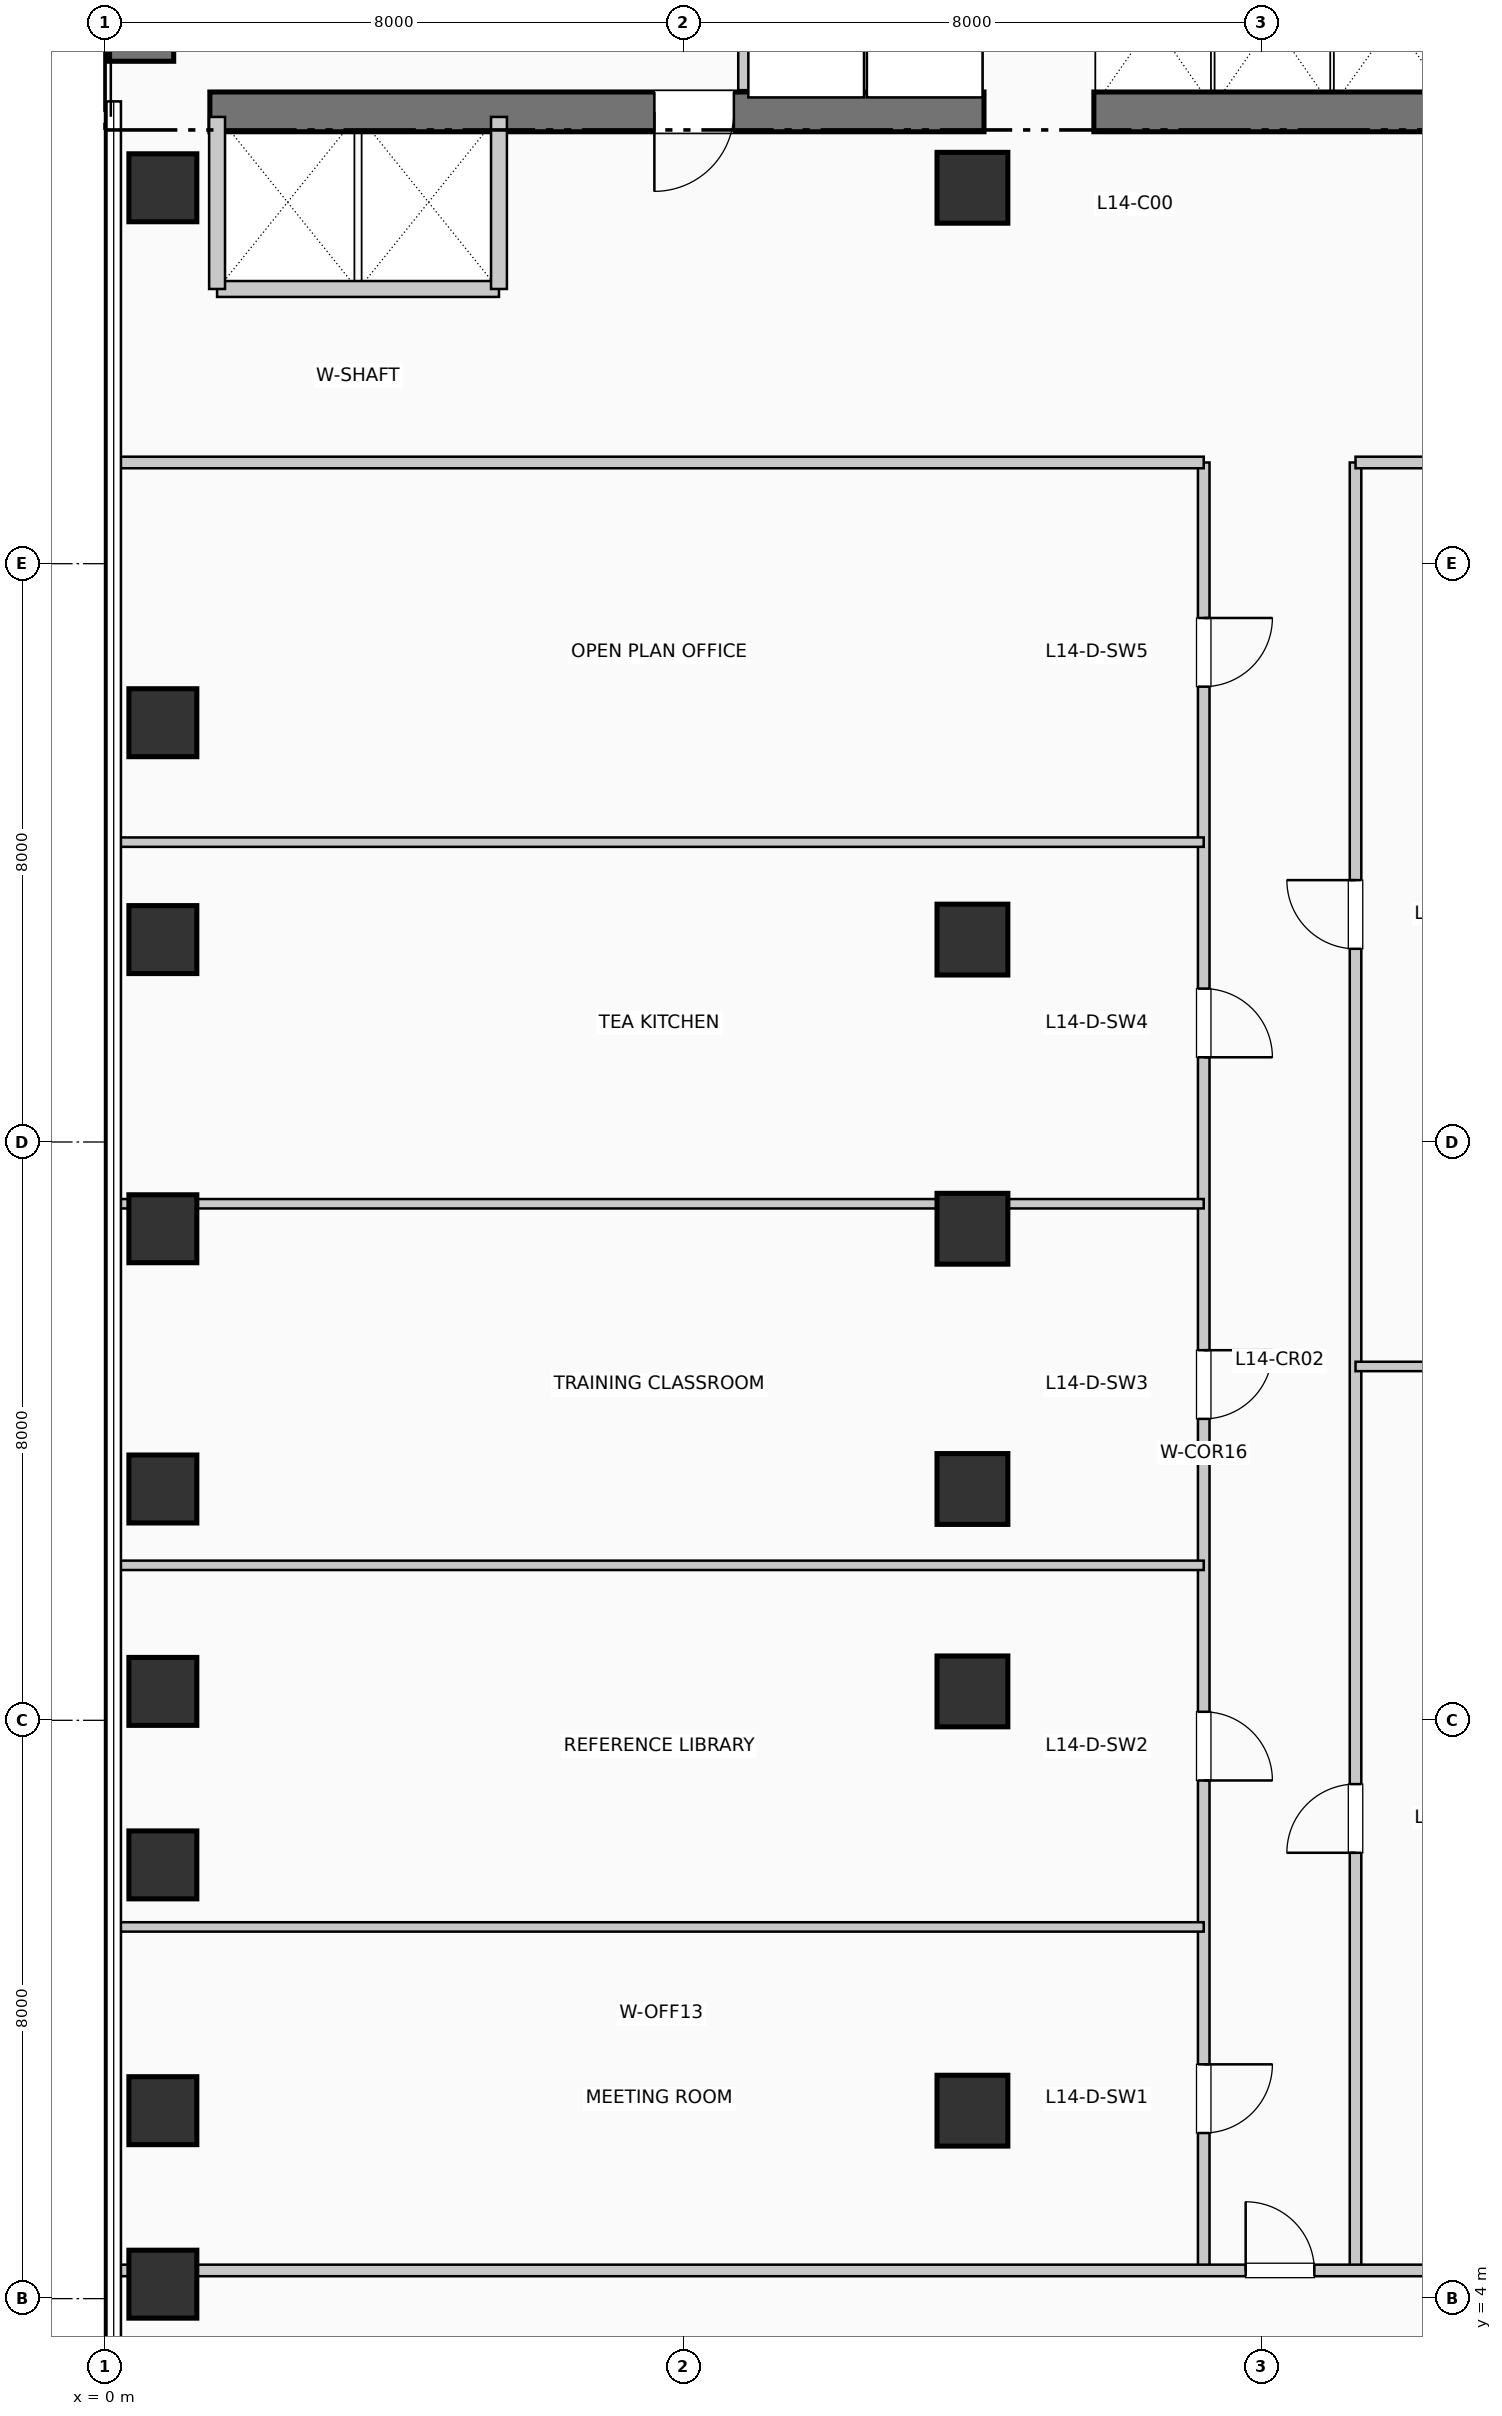
"""IFC4 building model, lengths in metres.
Left out: names, types, materials, properties, quantities, classifications, styles, units other than length and angle.
Written with IfcOpenShell. Run it as: python <this file> out.ifc"""

import sys

from ifc_helpers import new_model, si_unit, direction, frame, frame_2d, origin, origin_2d, place, context, subcontext, project, spatial, rectangle, extrude, element, fill, save


model = new_model("IFC4")
c1 = context("Model", 3, precision=1e-05, world=origin(), true_north=direction((0.0, 1.0)))
c2 = subcontext(c1, "Body", "Model", "MODEL_VIEW")
j1 = project(units=[si_unit("LENGTHUNIT", "METRE"), si_unit("PLANEANGLEUNIT", "RADIAN")], contexts=[c1])
p1 = place(None, origin())
s1 = spatial("IfcSite", under=j1, at=p1, CompositionType="ELEMENT")
p2 = place(p1, origin())
s2 = spatial("IfcBuilding", under=s1, at=p2, CompositionType="ELEMENT")
p3 = place(p2, frame((0.0, 0.0, 62.04)))
s3 = spatial("IfcBuildingStorey", under=s2, at=p3, CompositionType="ELEMENT", Elevation=62.04)
p4 = place(p3, frame((0.5, 34.95, 0.0), z_axis=(0.0, 0.0, 1.0), x_axis=(0.0, 1.0, 0.0)))
e1 = element("IfcWall", 1, at=p4, inside=s3, PredefinedType="SHEAR", context=c2, shape_type="SweptSolid", body=[
    extrude(rectangle(XDim=7.9, YDim=0.9, at=frame_2d((3.95, 0.0))), origin(), (0.0, 0.0, 1.0), 3.96),
])
p5 = place(p3, frame((1.45, 34.25, 0.0), z_axis=(0.0, 0.0, 1.0), x_axis=(1.0, 0.0, 0.0)))
e2 = element("IfcWall", 2, at=p5, inside=s3, PredefinedType="SHEAR", context=c2, shape_type="SweptSolid", body=[
    extrude(rectangle(XDim=10.71, YDim=0.55, at=frame_2d((5.355, 0.0))), origin(), (0.0, 0.0, 1.0), 3.96),
])
p6 = place(p5, frame((7.25, 0.0, 0.0), z_axis=(0.0, 0.0, 1.0), x_axis=(-1.0, 0.0, 0.0)))
e3 = element("IfcOpeningElement", 3, at=p6, cuts=e2, PredefinedType="OPENING", context=c2, shape_type="SweptSolid", body=[
    extrude(rectangle(XDim=1.1, YDim=2.15, at=frame_2d((0.55, 1.075))), frame((0.0, 0.285, 0.0), z_axis=(0.0, -1.0, 0.0), x_axis=(1.0, 0.0, 0.0)), (0.0, 0.0, 1.0), 0.57),
])
p7 = place(p3, frame((13.68, 34.25, 0.0), z_axis=(0.0, 0.0, 1.0), x_axis=(1.0, 0.0, 0.0)))
e4 = element("IfcWall", 4, at=p7, inside=s3, PredefinedType="SHEAR", context=c2, shape_type="SweptSolid", body=[
    extrude(rectangle(XDim=6.12, YDim=0.55, at=frame_2d((3.06, 0.0))), origin(), (0.0, 0.0, 1.0), 3.96),
])
for number, where, z_axis, x_axis in (
    (5, (0.8, 4.2, 0.0), (0.0, 0.0, 1.0), (1.0, 0.0, 0.0)),
    (6, (0.8, 6.6, 0.0), (0.0, 0.0, 1.0), (1.0, 0.0, 0.0)),
    (7, (0.8, 10.0, 0.0), (0.0, 0.0, 1.0), (1.0, 0.0, 0.0)),
    (8, (0.8, 12.4, 0.0), (0.0, 0.0, 1.0), (1.0, 0.0, 0.0)),
    (9, (0.8, 15.2, 0.0), (0.0, 0.0, 1.0), (1.0, 0.0, 0.0)),
    (10, (0.8, 18.8, 0.0), (0.0, 0.0, 1.0), (1.0, 0.0, 0.0)),
    (11, (0.8, 22.8, 0.0), (0.0, 0.0, 1.0), (1.0, 0.0, 0.0)),
    (12, (0.8, 25.8, 0.0), (0.0, 0.0, 1.0), (1.0, 0.0, 0.0)),
    (13, (0.8, 33.2, 0.0), (0.0, 0.0, 1.0), (1.0, 0.0, 0.0)),
):
    element("IfcColumn", number, at=place(p3, frame(where, z_axis=z_axis, x_axis=x_axis)), inside=s3, PredefinedType="COLUMN", context=c2, shape_type="SweptSolid", body=[
        extrude(rectangle(XDim=0.94, YDim=0.94, at=origin_2d()), origin(), (0.0, 0.0, 1.0), 3.96),
    ])
for number, where, z_axis, x_axis in (
    (14, (12.0, 6.6, 0.0), (0.0, 0.0, 1.0), (1.0, 0.0, 0.0)),
    (15, (12.0, 12.4, 0.0), (0.0, 0.0, 1.0), (1.0, 0.0, 0.0)),
    (16, (12.0, 15.2, 0.0), (0.0, 0.0, 1.0), (1.0, 0.0, 0.0)),
    (17, (12.0, 18.8, 0.0), (0.0, 0.0, 1.0), (1.0, 0.0, 0.0)),
    (18, (12.0, 22.8, 0.0), (0.0, 0.0, 1.0), (1.0, 0.0, 0.0)),
    (19, (12.0, 33.2, 0.0), (0.0, 0.0, 1.0), (1.0, 0.0, 0.0)),
):
    element("IfcColumn", number, at=place(p3, frame(where, z_axis=z_axis, x_axis=x_axis)), inside=s3, PredefinedType="COLUMN", context=c2, shape_type="SweptSolid", body=[
        extrude(rectangle(XDim=0.98, YDim=0.98, at=origin_2d()), origin(), (0.0, 0.0, 1.0), 3.96),
    ])
p8 = place(p3, frame((8.86, 34.55, 0.0), z_axis=(0.0, 0.0, 1.0), x_axis=(0.0, 1.0, 0.0)))
e20 = element("IfcWall", 20, at=p8, inside=s3, PredefinedType="PARTITIONING", context=c2, shape_type="SweptSolid", body=[
    extrude(rectangle(XDim=2.5, YDim=0.2, at=frame_2d((1.25, 0.0))), origin(), (0.0, 0.0, 1.0), 3.71),
])
p9 = place(p3, frame((1.55, 31.8, 0.0), z_axis=(0.0, 0.0, 1.0), x_axis=(1.0, 0.0, 0.0)))
e21 = element("IfcWall", 21, at=p9, inside=s3, PredefinedType="PARTITIONING", context=c2, shape_type="SweptSolid", body=[
    extrude(rectangle(XDim=3.9, YDim=0.22, at=frame_2d((1.95, 0.0))), origin(), (0.0, 0.0, 1.0), 3.71),
])
for number, where, z_axis, x_axis in (
    (22, (1.55, 31.8, 0.0), (0.0, 0.0, 1.0), (0.0, 1.0, 0.0)),
    (23, (5.45, 31.8, 0.0), (0.0, 0.0, 1.0), (0.0, 1.0, 0.0)),
):
    element("IfcWall", number, at=place(p3, frame(where, z_axis=z_axis, x_axis=x_axis)), inside=s3, PredefinedType="PARTITIONING", context=c2, shape_type="SweptSolid", body=[
        extrude(rectangle(XDim=2.38, YDim=0.22, at=frame_2d((1.19, 0.0))), origin(), (0.0, 0.0, 1.0), 3.71),
    ])
p10 = place(p3, frame((15.2, 4.39, 0.0), z_axis=(0.0, 0.0, 1.0), x_axis=(0.0, 1.0, 0.0)))
e24 = element("IfcWall", 24, at=p10, inside=s3, PredefinedType="PARTITIONING", context=c2, shape_type="SweptSolid", body=[
    extrude(rectangle(XDim=25.01, YDim=0.16, at=frame_2d((12.505, 0.0))), origin(), (0.0, 0.0, 1.0), 3.71),
])
p11 = place(p10, frame((2.851, 0.0, 0.0), z_axis=(0.0, 0.0, 1.0), x_axis=(-1.0, 0.0, 0.0)))
e25 = element("IfcOpeningElement", 25, at=p11, cuts=e24, PredefinedType="OPENING", context=c2, shape_type="SweptSolid", body=[
    extrude(rectangle(XDim=0.95, YDim=2.15, at=frame_2d((0.475, 1.075))), frame((0.0, 0.09, 0.0), z_axis=(0.0, -1.0, 0.0), x_axis=(1.0, 0.0, 0.0)), (0.0, 0.0, 1.0), 0.18),
])
p12 = place(p10, frame((7.728, 0.0, 0.0), z_axis=(0.0, 0.0, 1.0), x_axis=(-1.0, 0.0, 0.0)))
e26 = element("IfcOpeningElement", 26, at=p12, cuts=e24, PredefinedType="OPENING", context=c2, shape_type="SweptSolid", body=[
    extrude(rectangle(XDim=0.95, YDim=2.15, at=frame_2d((0.475, 1.075))), frame((0.0, 0.09, 0.0), z_axis=(0.0, -1.0, 0.0), x_axis=(1.0, 0.0, 0.0)), (0.0, 0.0, 1.0), 0.18),
])
p13 = place(p10, frame((12.73, 0.0, 0.0), z_axis=(0.0, 0.0, 1.0), x_axis=(-1.0, 0.0, 0.0)))
e27 = element("IfcOpeningElement", 27, at=p13, cuts=e24, PredefinedType="OPENING", context=c2, shape_type="SweptSolid", body=[
    extrude(rectangle(XDim=0.95, YDim=2.15, at=frame_2d((0.475, 1.075))), frame((0.0, 0.09, 0.0), z_axis=(0.0, -1.0, 0.0), x_axis=(1.0, 0.0, 0.0)), (0.0, 0.0, 1.0), 0.18),
])
p14 = place(p10, frame((17.732, 0.0, 0.0), z_axis=(0.0, 0.0, 1.0), x_axis=(-1.0, 0.0, 0.0)))
e28 = element("IfcOpeningElement", 28, at=p14, cuts=e24, PredefinedType="OPENING", context=c2, shape_type="SweptSolid", body=[
    extrude(rectangle(XDim=0.95, YDim=2.15, at=frame_2d((0.475, 1.075))), frame((0.0, 0.09, 0.0), z_axis=(0.0, -1.0, 0.0), x_axis=(1.0, 0.0, 0.0)), (0.0, 0.0, 1.0), 0.18),
])
p15 = place(p10, frame((22.859, 0.0, 0.0), z_axis=(0.0, 0.0, 1.0), x_axis=(-1.0, 0.0, 0.0)))
e29 = element("IfcOpeningElement", 29, at=p15, cuts=e24, PredefinedType="OPENING", context=c2, shape_type="SweptSolid", body=[
    extrude(rectangle(XDim=0.95, YDim=2.15, at=frame_2d((0.475, 1.075))), frame((0.0, 0.09, 0.0), z_axis=(0.0, -1.0, 0.0), x_axis=(1.0, 0.0, 0.0)), (0.0, 0.0, 1.0), 0.18),
])
p16 = place(p3, frame((17.3, 4.39, 0.0), z_axis=(0.0, 0.0, 1.0), x_axis=(0.0, 1.0, 0.0)))
e30 = element("IfcWall", 30, at=p16, inside=s3, PredefinedType="PARTITIONING", context=c2, shape_type="SweptSolid", body=[
    extrude(rectangle(XDim=25.01, YDim=0.16, at=frame_2d((12.505, 0.0))), origin(), (0.0, 0.0, 1.0), 3.71),
])
p17 = place(p16, frame((5.778, 0.0, 0.0)))
e31 = element("IfcOpeningElement", 31, at=p17, cuts=e30, PredefinedType="OPENING", context=c2, shape_type="SweptSolid", body=[
    extrude(rectangle(XDim=0.95, YDim=2.15, at=frame_2d((0.475, 1.075))), frame((0.0, 0.09, 0.0), z_axis=(0.0, -1.0, 0.0), x_axis=(1.0, 0.0, 0.0)), (0.0, 0.0, 1.0), 0.18),
])
p18 = place(p16, frame((18.282, 0.0, 0.0)))
e32 = element("IfcOpeningElement", 32, at=p18, cuts=e30, PredefinedType="OPENING", context=c2, shape_type="SweptSolid", body=[
    extrude(rectangle(XDim=0.95, YDim=2.15, at=frame_2d((0.475, 1.075))), frame((0.0, 0.09, 0.0), z_axis=(0.0, -1.0, 0.0), x_axis=(1.0, 0.0, 0.0)), (0.0, 0.0, 1.0), 0.18),
])
p19 = place(p3, frame((0.19, 4.39, 0.0), z_axis=(0.0, 0.0, 1.0), x_axis=(1.0, 0.0, 0.0)))
e33 = element("IfcWall", 33, at=p19, inside=s3, PredefinedType="PARTITIONING", context=c2, shape_type="SweptSolid", body=[
    extrude(rectangle(XDim=23.26, YDim=0.16, at=frame_2d((11.63, 0.0))), origin(), (0.0, 0.0, 1.0), 2.995),
])
p20 = place(p19, frame((15.59, 0.0, 0.0)))
e34 = element("IfcOpeningElement", 34, at=p20, cuts=e33, PredefinedType="OPENING", context=c2, shape_type="SweptSolid", body=[
    extrude(rectangle(XDim=0.95, YDim=2.15, at=frame_2d((0.475, 1.075))), frame((0.0, 0.09, 0.0), z_axis=(0.0, -1.0, 0.0), x_axis=(1.0, 0.0, 0.0)), (0.0, 0.0, 1.0), 0.18),
])
p21 = place(p3, frame((0.19, 29.4, 0.0), z_axis=(0.0, 0.0, 1.0), x_axis=(1.0, 0.0, 0.0)))
e35 = element("IfcWall", 35, at=p21, inside=s3, PredefinedType="PARTITIONING", context=c2, shape_type="SweptSolid", body=[
    extrude(rectangle(XDim=15.01, YDim=0.16, at=frame_2d((7.505, 0.0))), origin(), (0.0, 0.0, 1.0), 3.365),
])
p22 = place(p3, frame((17.3, 29.4, 0.0), z_axis=(0.0, 0.0, 1.0), x_axis=(1.0, 0.0, 0.0)))
e36 = element("IfcWall", 36, at=p22, inside=s3, PredefinedType="PARTITIONING", context=c2, shape_type="SweptSolid", body=[
    extrude(rectangle(XDim=6.15, YDim=0.16, at=frame_2d((3.075, 0.0))), origin(), (0.0, 0.0, 1.0), 3.71),
])
for number, where, z_axis, x_axis in (
    (37, (0.19, 9.142, 0.0), (0.0, 0.0, 1.0), (1.0, 0.0, 0.0)),
    (38, (0.19, 14.144, 0.0), (0.0, 0.0, 1.0), (1.0, 0.0, 0.0)),
):
    element("IfcWall", number, at=place(p3, frame(where, z_axis=z_axis, x_axis=x_axis)), inside=s3, PredefinedType="PARTITIONING", context=c2, shape_type="SweptSolid", body=[
        extrude(rectangle(XDim=15.01, YDim=0.13, at=frame_2d((7.505, 0.0))), origin(), (0.0, 0.0, 1.0), 3.71),
    ])
p23 = place(p3, frame((0.19, 19.146, 0.0), z_axis=(0.0, 0.0, 1.0), x_axis=(1.0, 0.0, 0.0)))
e39 = element("IfcWall", 39, at=p23, inside=s3, PredefinedType="PARTITIONING", context=c2, shape_type="SweptSolid", body=[
    extrude(rectangle(XDim=15.01, YDim=0.13, at=frame_2d((7.505, 0.0))), origin(), (0.0, 0.0, 1.0), 2.995),
])
p24 = place(p3, frame((0.19, 24.148, 0.0), z_axis=(0.0, 0.0, 1.0), x_axis=(1.0, 0.0, 0.0)))
e40 = element("IfcWall", 40, at=p24, inside=s3, PredefinedType="PARTITIONING", context=c2, shape_type="SweptSolid", body=[
    extrude(rectangle(XDim=15.01, YDim=0.13, at=frame_2d((7.505, 0.0))), origin(), (0.0, 0.0, 1.0), 3.71),
])
p25 = place(p3, frame((17.3, 16.895, 0.0), z_axis=(0.0, 0.0, 1.0), x_axis=(1.0, 0.0, 0.0)))
e41 = element("IfcWall", 41, at=p25, inside=s3, PredefinedType="PARTITIONING", context=c2, shape_type="SweptSolid", body=[
    extrude(rectangle(XDim=6.15, YDim=0.13, at=frame_2d((3.075, 0.0))), origin(), (0.0, 0.0, 1.0), 3.71),
])
p26 = place(p6, origin())
e42 = element("IfcDoor", 42, at=p26, inside=s3, OperationType="SINGLE_SWING_LEFT", PredefinedType="DOOR", context=c2, shape_type="SweptSolid", body=[
    extrude(rectangle(XDim=1.1, YDim=2.15, at=frame_2d((0.55, 1.075))), frame((0.0, 0.025, 0.0), z_axis=(0.0, -1.0, 0.0), x_axis=(1.0, 0.0, 0.0)), (0.0, 0.0, 1.0), 0.05),
])
fill(e3, e42)
p27 = place(p20, origin())
e43 = element("IfcDoor", 43, at=p27, inside=s3, OperationType="SINGLE_SWING_LEFT", PredefinedType="DOOR", context=c2, shape_type="SweptSolid", body=[
    extrude(rectangle(XDim=0.95, YDim=2.15, at=frame_2d((0.475, 1.075))), frame((0.0, 0.025, 0.0), z_axis=(0.0, -1.0, 0.0), x_axis=(1.0, 0.0, 0.0)), (0.0, 0.0, 1.0), 0.05),
])
fill(e34, e43)
p28 = place(p11, origin())
e44 = element("IfcDoor", 44, at=p28, inside=s3, OperationType="SINGLE_SWING_RIGHT", PredefinedType="DOOR", context=c2, shape_type="SweptSolid", body=[
    extrude(rectangle(XDim=0.95, YDim=2.15, at=frame_2d((0.475, 1.075))), frame((0.0, 0.025, 0.0), z_axis=(0.0, -1.0, 0.0), x_axis=(1.0, 0.0, 0.0)), (0.0, 0.0, 1.0), 0.05),
])
fill(e25, e44)
p29 = place(p12, origin())
e45 = element("IfcDoor", 45, at=p29, inside=s3, OperationType="SINGLE_SWING_LEFT", PredefinedType="DOOR", context=c2, shape_type="SweptSolid", body=[
    extrude(rectangle(XDim=0.95, YDim=2.15, at=frame_2d((0.475, 1.075))), frame((0.0, 0.025, 0.0), z_axis=(0.0, -1.0, 0.0), x_axis=(1.0, 0.0, 0.0)), (0.0, 0.0, 1.0), 0.05),
])
fill(e26, e45)
p30 = place(p13, origin())
e46 = element("IfcDoor", 46, at=p30, inside=s3, OperationType="SINGLE_SWING_RIGHT", PredefinedType="DOOR", context=c2, shape_type="SweptSolid", body=[
    extrude(rectangle(XDim=0.95, YDim=2.15, at=frame_2d((0.475, 1.075))), frame((0.0, 0.025, 0.0), z_axis=(0.0, -1.0, 0.0), x_axis=(1.0, 0.0, 0.0)), (0.0, 0.0, 1.0), 0.05),
])
fill(e27, e46)
p31 = place(p14, origin())
e47 = element("IfcDoor", 47, at=p31, inside=s3, OperationType="SINGLE_SWING_LEFT", PredefinedType="DOOR", context=c2, shape_type="SweptSolid", body=[
    extrude(rectangle(XDim=0.95, YDim=2.15, at=frame_2d((0.475, 1.075))), frame((0.0, 0.025, 0.0), z_axis=(0.0, -1.0, 0.0), x_axis=(1.0, 0.0, 0.0)), (0.0, 0.0, 1.0), 0.05),
])
fill(e28, e47)
p32 = place(p15, origin())
e48 = element("IfcDoor", 48, at=p32, inside=s3, OperationType="SINGLE_SWING_RIGHT", PredefinedType="DOOR", context=c2, shape_type="SweptSolid", body=[
    extrude(rectangle(XDim=0.95, YDim=2.15, at=frame_2d((0.475, 1.075))), frame((0.0, 0.025, 0.0), z_axis=(0.0, -1.0, 0.0), x_axis=(1.0, 0.0, 0.0)), (0.0, 0.0, 1.0), 0.05),
])
fill(e29, e48)
p33 = place(p17, origin())
e49 = element("IfcDoor", 49, at=p33, inside=s3, OperationType="SINGLE_SWING_LEFT", PredefinedType="DOOR", context=c2, shape_type="SweptSolid", body=[
    extrude(rectangle(XDim=0.95, YDim=2.15, at=frame_2d((0.475, 1.075))), frame((0.0, 0.025, 0.0), z_axis=(0.0, -1.0, 0.0), x_axis=(1.0, 0.0, 0.0)), (0.0, 0.0, 1.0), 0.05),
])
fill(e31, e49)
p34 = place(p18, origin())
e50 = element("IfcDoor", 50, at=p34, inside=s3, OperationType="SINGLE_SWING_RIGHT", PredefinedType="DOOR", context=c2, shape_type="SweptSolid", body=[
    extrude(rectangle(XDim=0.95, YDim=2.15, at=frame_2d((0.475, 1.075))), frame((0.0, 0.025, 0.0), z_axis=(0.0, -1.0, 0.0), x_axis=(1.0, 0.0, 0.0)), (0.0, 0.0, 1.0), 0.05),
])
fill(e32, e50)
save(model, sys.argv[1])
